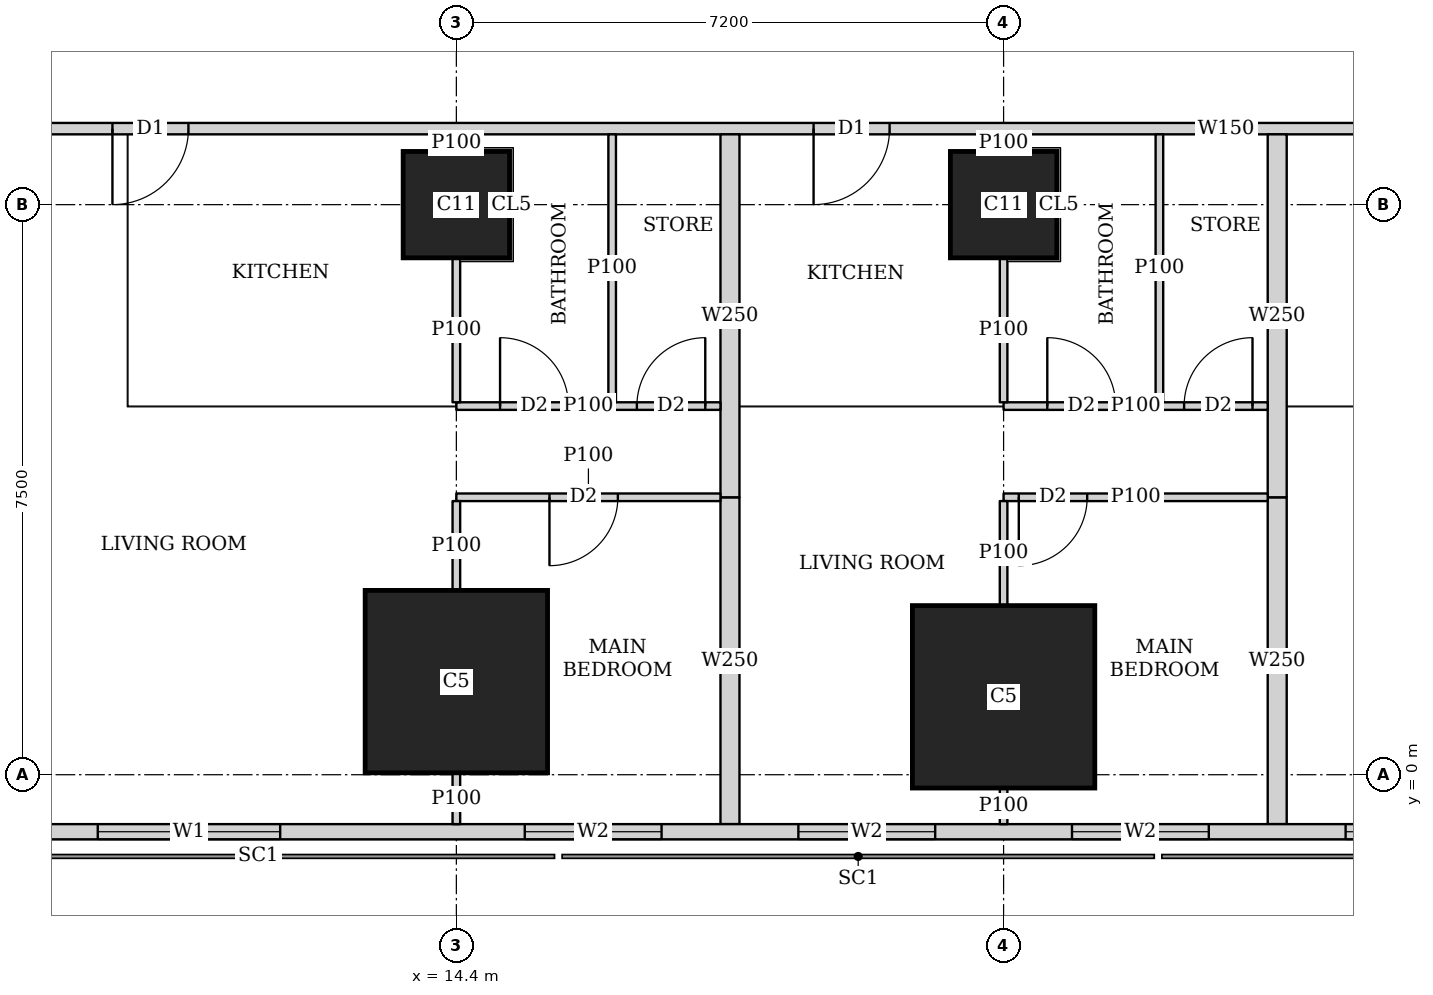
"""IFC4 building model, lengths in metres.
Left out: names, types, materials, properties, quantities, classifications, styles, units other than length and angle.
Written with IfcOpenShell. Run it as: python <this file> out.ifc"""

import sys

from ifc_helpers import new_model, si_unit, direction, frame, frame_2d, origin, origin_2d, place, context, subcontext, project, spatial, rectangle, extrude, element, fill, save


model = new_model("IFC4")
c1 = context("Model", 3, precision=1e-05, world=origin(), true_north=direction((0.0, 1.0)))
c2 = subcontext(c1, "Body", "Model", "MODEL_VIEW")
j1 = project(units=[si_unit("LENGTHUNIT", "METRE"), si_unit("PLANEANGLEUNIT", "RADIAN")], contexts=[c1])
p1 = place(None, origin())
s1 = spatial("IfcSite", under=j1, at=p1, CompositionType="ELEMENT")
p2 = place(p1, origin())
s2 = spatial("IfcBuilding", under=s1, at=p2, CompositionType="ELEMENT")
p3 = place(p2, frame((0.0, 0.0, 208.7)))
s3 = spatial("IfcBuildingStorey", under=s2, at=p3, CompositionType="ELEMENT", Elevation=208.7)
for number, where, z_axis, x_axis in (
    (1, (14.4, 1.225, 0.0), (0.0, 0.0, 1.0), (1.0, 0.0, 0.0)),
    (2, (21.6, 1.025, 0.0), (0.0, 0.0, 1.0), (1.0, 0.0, 0.0)),
):
    element("IfcColumn", number, at=place(p3, frame(where, z_axis=z_axis, x_axis=x_axis)), inside=s3, PredefinedType="COLUMN", context=c2, shape_type="SweptSolid", body=[
        extrude(rectangle(XDim=2.4, YDim=2.4, at=origin_2d()), origin(), (0.0, 0.0, 1.0), 3.75),
    ])
for number, where, z_axis, x_axis in (
    (3, (14.4, 7.5, 0.0), (0.0, 0.0, 1.0), (1.0, 0.0, 0.0)),
    (4, (21.6, 7.5, 0.0), (0.0, 0.0, 1.0), (1.0, 0.0, 0.0)),
):
    element("IfcColumn", number, at=place(p3, frame(where, z_axis=z_axis, x_axis=x_axis)), inside=s3, PredefinedType="COLUMN", context=c2, shape_type="SweptSolid", body=[
        extrude(rectangle(XDim=1.4, YDim=1.4, at=origin_2d()), origin(), (0.0, 0.0, 1.0), 3.75),
    ])
p4 = place(p3, frame((7.363, -0.75, 0.0), z_axis=(0.0, 0.0, 1.0), x_axis=(1.0, 0.0, 0.0)))
e5 = element("IfcWall", 5, at=p4, inside=s3, PredefinedType="SOLIDWALL", context=c2, shape_type="SweptSolid", body=[
    extrude(rectangle(XDim=40.428, YDim=0.2, at=frame_2d((20.214, 0.0))), origin(), (0.0, 0.0, 1.0), 3.5),
])
p5 = place(p4, frame((2.319, 0.0, 0.9)))
e6 = element("IfcOpeningElement", 6, at=p5, cuts=e5, PredefinedType="OPENING", context=c2, shape_type="SweptSolid", body=[
    extrude(rectangle(XDim=2.4, YDim=1.5, at=frame_2d((1.2, 0.75))), frame((0.0, 0.11, 0.0), z_axis=(0.0, -1.0, 0.0), x_axis=(1.0, 0.0, 0.0)), (0.0, 0.0, 1.0), 0.22),
])
p6 = place(p4, frame((7.937, 0.0, 0.9)))
e7 = element("IfcOpeningElement", 7, at=p6, cuts=e5, PredefinedType="OPENING", context=c2, shape_type="SweptSolid", body=[
    extrude(rectangle(XDim=1.8, YDim=1.5, at=frame_2d((0.9, 0.75))), frame((0.0, 0.11, 0.0), z_axis=(0.0, -1.0, 0.0), x_axis=(1.0, 0.0, 0.0)), (0.0, 0.0, 1.0), 0.22),
])
p7 = place(p4, frame((11.537, 0.0, 0.9)))
e8 = element("IfcOpeningElement", 8, at=p7, cuts=e5, PredefinedType="OPENING", context=c2, shape_type="SweptSolid", body=[
    extrude(rectangle(XDim=1.8, YDim=1.5, at=frame_2d((0.9, 0.75))), frame((0.0, 0.11, 0.0), z_axis=(0.0, -1.0, 0.0), x_axis=(1.0, 0.0, 0.0)), (0.0, 0.0, 1.0), 0.22),
])
p8 = place(p4, frame((15.137, 0.0, 0.9)))
e9 = element("IfcOpeningElement", 9, at=p8, cuts=e5, PredefinedType="OPENING", context=c2, shape_type="SweptSolid", body=[
    extrude(rectangle(XDim=1.8, YDim=1.5, at=frame_2d((0.9, 0.75))), frame((0.0, 0.11, 0.0), z_axis=(0.0, -1.0, 0.0), x_axis=(1.0, 0.0, 0.0)), (0.0, 0.0, 1.0), 0.22),
])
p9 = place(p4, frame((18.737, 0.0, 0.9)))
e10 = element("IfcOpeningElement", 10, at=p9, cuts=e5, PredefinedType="OPENING", context=c2, shape_type="SweptSolid", body=[
    extrude(rectangle(XDim=1.8, YDim=1.5, at=frame_2d((0.9, 0.75))), frame((0.0, 0.11, 0.0), z_axis=(0.0, -1.0, 0.0), x_axis=(1.0, 0.0, 0.0)), (0.0, 0.0, 1.0), 0.22),
])
p10 = place(p4, frame((22.337, 0.0, 0.9)))
e11 = element("IfcOpeningElement", 11, at=p10, cuts=e5, PredefinedType="OPENING", context=c2, shape_type="SweptSolid", body=[
    extrude(rectangle(XDim=1.8, YDim=1.5, at=frame_2d((0.9, 0.75))), frame((0.0, 0.11, 0.0), z_axis=(0.0, -1.0, 0.0), x_axis=(1.0, 0.0, 0.0)), (0.0, 0.0, 1.0), 0.22),
])
p11 = place(p4, frame((25.937, 0.0, 0.9)))
e12 = element("IfcOpeningElement", 12, at=p11, cuts=e5, PredefinedType="OPENING", context=c2, shape_type="SweptSolid", body=[
    extrude(rectangle(XDim=1.8, YDim=1.5, at=frame_2d((0.9, 0.75))), frame((0.0, 0.11, 0.0), z_axis=(0.0, -1.0, 0.0), x_axis=(1.0, 0.0, 0.0)), (0.0, 0.0, 1.0), 0.22),
])
p12 = place(p4, frame((29.537, 0.0, 0.9)))
e13 = element("IfcOpeningElement", 13, at=p12, cuts=e5, PredefinedType="OPENING", context=c2, shape_type="SweptSolid", body=[
    extrude(rectangle(XDim=1.8, YDim=1.5, at=frame_2d((0.9, 0.75))), frame((0.0, 0.11, 0.0), z_axis=(0.0, -1.0, 0.0), x_axis=(1.0, 0.0, 0.0)), (0.0, 0.0, 1.0), 0.22),
])
p13 = place(p3, frame((40.053, 8.5, 0.0), z_axis=(0.0, 0.0, 1.0), x_axis=(-1.0, 0.0, 0.0)))
e14 = element("IfcWall", 14, at=p13, inside=s3, PredefinedType="SOLIDWALL", context=c2, shape_type="SweptSolid", body=[
    extrude(rectangle(XDim=31.052, YDim=0.15, at=frame_2d((15.526, 0.0))), origin(), (0.0, 0.0, 1.0), 3.5),
])
p14 = place(p13, frame((29.178, 0.0, 0.0)))
e15 = element("IfcOpeningElement", 15, at=p14, cuts=e14, PredefinedType="OPENING", context=c2, shape_type="SweptSolid", body=[
    extrude(rectangle(XDim=1.0, YDim=2.1, at=frame_2d((0.5, 1.05))), frame((0.0, 0.085, 0.0), z_axis=(0.0, -1.0, 0.0), x_axis=(1.0, 0.0, 0.0)), (0.0, 0.0, 1.0), 0.17),
])
p15 = place(p13, frame((19.953, 0.0, 0.0)))
e16 = element("IfcOpeningElement", 16, at=p15, cuts=e14, PredefinedType="OPENING", context=c2, shape_type="SweptSolid", body=[
    extrude(rectangle(XDim=1.0, YDim=2.1, at=frame_2d((0.5, 1.05))), frame((0.0, 0.085, 0.0), z_axis=(0.0, -1.0, 0.0), x_axis=(1.0, 0.0, 0.0)), (0.0, 0.0, 1.0), 0.17),
])
p16 = place(p13, frame((12.753, 0.0, 0.0)))
e17 = element("IfcOpeningElement", 17, at=p16, cuts=e14, PredefinedType="OPENING", context=c2, shape_type="SweptSolid", body=[
    extrude(rectangle(XDim=1.0, YDim=2.1, at=frame_2d((0.5, 1.05))), frame((0.0, 0.085, 0.0), z_axis=(0.0, -1.0, 0.0), x_axis=(1.0, 0.0, 0.0)), (0.0, 0.0, 1.0), 0.17),
])
p17 = place(p13, frame((0.15, 0.0, 0.0)))
e18 = element("IfcOpeningElement", 18, at=p17, cuts=e14, PredefinedType="OPENING", context=c2, shape_type="SweptSolid", body=[
    extrude(rectangle(XDim=1.0, YDim=2.1, at=frame_2d((0.5, 1.05))), frame((0.0, 0.085, 0.0), z_axis=(0.0, -1.0, 0.0), x_axis=(1.0, 0.0, 0.0)), (0.0, 0.0, 1.0), 0.17),
])
p18 = place(p3, frame((17.875, 3.65, 0.0), z_axis=(0.0, 0.0, 1.0), x_axis=(-1.0, 0.0, 0.0)))
e19 = element("IfcWall", 19, at=p18, inside=s3, PredefinedType="PARTITIONING", context=c2, shape_type="SweptSolid", body=[
    extrude(rectangle(XDim=3.475, YDim=0.1, at=frame_2d((1.738, 0.0))), origin(), (0.0, 0.0, 1.0), 3.5),
])
p19 = place(p18, frame((1.35, 0.0, 0.0)))
e20 = element("IfcOpeningElement", 20, at=p19, cuts=e19, PredefinedType="OPENING", context=c2, shape_type="SweptSolid", body=[
    extrude(rectangle(XDim=0.9, YDim=2.1, at=frame_2d((0.45, 1.05))), frame((0.0, 0.06, 0.0), z_axis=(0.0, -1.0, 0.0), x_axis=(1.0, 0.0, 0.0)), (0.0, 0.0, 1.0), 0.12),
])
p20 = place(p3, frame((17.875, 4.85, 0.0), z_axis=(0.0, 0.0, 1.0), x_axis=(-1.0, 0.0, 0.0)))
e21 = element("IfcWall", 21, at=p20, inside=s3, PredefinedType="PARTITIONING", context=c2, shape_type="SweptSolid", body=[
    extrude(rectangle(XDim=3.475, YDim=0.1, at=frame_2d((1.738, 0.0))), origin(), (0.0, 0.0, 1.0), 3.5),
])
p21 = place(p20, frame((2.0, 0.0, 0.0)))
e22 = element("IfcOpeningElement", 22, at=p21, cuts=e21, PredefinedType="OPENING", context=c2, shape_type="SweptSolid", body=[
    extrude(rectangle(XDim=0.9, YDim=2.1, at=frame_2d((0.45, 1.05))), frame((0.0, 0.06, 0.0), z_axis=(0.0, -1.0, 0.0), x_axis=(1.0, 0.0, 0.0)), (0.0, 0.0, 1.0), 0.12),
])
p22 = place(p20, frame((0.2, 0.0, 0.0)))
e23 = element("IfcOpeningElement", 23, at=p22, cuts=e21, PredefinedType="OPENING", context=c2, shape_type="SweptSolid", body=[
    extrude(rectangle(XDim=0.9, YDim=2.1, at=frame_2d((0.45, 1.05))), frame((0.0, 0.06, 0.0), z_axis=(0.0, -1.0, 0.0), x_axis=(1.0, 0.0, 0.0)), (0.0, 0.0, 1.0), 0.12),
])
p23 = place(p3, frame((14.4, -0.65, 0.0), z_axis=(0.0, 0.0, 1.0), x_axis=(0.0, 1.0, 0.0)))
e24 = element("IfcWall", 24, at=p23, inside=s3, PredefinedType="PARTITIONING", context=c2, shape_type="SweptSolid", body=[
    extrude(rectangle(XDim=0.674, YDim=0.1, at=frame_2d((0.337, 0.0))), origin(), (0.0, 0.0, 1.0), 3.5),
])
p24 = place(p3, frame((14.4, 2.426, 0.0), z_axis=(0.0, 0.0, 1.0), x_axis=(0.0, 1.0, 0.0)))
e25 = element("IfcWall", 25, at=p24, inside=s3, PredefinedType="PARTITIONING", context=c2, shape_type="SweptSolid", body=[
    extrude(rectangle(XDim=1.174, YDim=0.1, at=frame_2d((0.587, 0.0))), origin(), (0.0, 0.0, 1.0), 3.5),
])
p25 = place(p3, frame((14.4, 4.9, 0.0), z_axis=(0.0, 0.0, 1.0), x_axis=(0.0, 1.0, 0.0)))
e26 = element("IfcWall", 26, at=p25, inside=s3, PredefinedType="PARTITIONING", context=c2, shape_type="SweptSolid", body=[
    extrude(rectangle(XDim=1.899, YDim=0.1, at=frame_2d((0.95, 0.0))), origin(), (0.0, 0.0, 1.0), 3.5),
])
p26 = place(p3, frame((14.4, 8.201, 0.0), z_axis=(0.0, 0.0, 1.0), x_axis=(0.0, 1.0, 0.0)))
e27 = element("IfcWall", 27, at=p26, inside=s3, PredefinedType="PARTITIONING", context=c2, shape_type="SweptSolid", body=[
    extrude(rectangle(XDim=0.224, YDim=0.1, at=frame_2d((0.112, 0.0))), origin(), (0.0, 0.0, 1.0), 3.5),
])
p27 = place(p3, frame((16.45, 4.9, 0.0), z_axis=(0.0, 0.0, 1.0), x_axis=(0.0, 1.0, 0.0)))
e28 = element("IfcWall", 28, at=p27, inside=s3, PredefinedType="PARTITIONING", context=c2, shape_type="SweptSolid", body=[
    extrude(rectangle(XDim=3.525, YDim=0.1, at=frame_2d((1.763, 0.0))), origin(), (0.0, 0.0, 1.0), 3.5),
])
p28 = place(p3, frame((25.075, 3.65, 0.0), z_axis=(0.0, 0.0, 1.0), x_axis=(-1.0, 0.0, 0.0)))
e29 = element("IfcWall", 29, at=p28, inside=s3, PredefinedType="PARTITIONING", context=c2, shape_type="SweptSolid", body=[
    extrude(rectangle(XDim=3.475, YDim=0.1, at=frame_2d((1.737, 0.0))), origin(), (0.0, 0.0, 1.0), 3.5),
])
p29 = place(p28, frame((2.375, 0.0, 0.0)))
e30 = element("IfcOpeningElement", 30, at=p29, cuts=e29, PredefinedType="OPENING", context=c2, shape_type="SweptSolid", body=[
    extrude(rectangle(XDim=0.9, YDim=2.1, at=frame_2d((0.45, 1.05))), frame((0.0, 0.06, 0.0), z_axis=(0.0, -1.0, 0.0), x_axis=(1.0, 0.0, 0.0)), (0.0, 0.0, 1.0), 0.12),
])
p30 = place(p3, frame((25.075, 4.85, 0.0), z_axis=(0.0, 0.0, 1.0), x_axis=(-1.0, 0.0, 0.0)))
e31 = element("IfcWall", 31, at=p30, inside=s3, PredefinedType="PARTITIONING", context=c2, shape_type="SweptSolid", body=[
    extrude(rectangle(XDim=3.475, YDim=0.1, at=frame_2d((1.737, 0.0))), origin(), (0.0, 0.0, 1.0), 3.5),
])
p31 = place(p30, frame((2.0, 0.0, 0.0)))
e32 = element("IfcOpeningElement", 32, at=p31, cuts=e31, PredefinedType="OPENING", context=c2, shape_type="SweptSolid", body=[
    extrude(rectangle(XDim=0.9, YDim=2.1, at=frame_2d((0.45, 1.05))), frame((0.0, 0.06, 0.0), z_axis=(0.0, -1.0, 0.0), x_axis=(1.0, 0.0, 0.0)), (0.0, 0.0, 1.0), 0.12),
])
p32 = place(p30, frame((0.2, 0.0, 0.0)))
e33 = element("IfcOpeningElement", 33, at=p32, cuts=e31, PredefinedType="OPENING", context=c2, shape_type="SweptSolid", body=[
    extrude(rectangle(XDim=0.9, YDim=2.1, at=frame_2d((0.45, 1.05))), frame((0.0, 0.06, 0.0), z_axis=(0.0, -1.0, 0.0), x_axis=(1.0, 0.0, 0.0)), (0.0, 0.0, 1.0), 0.12),
])
p33 = place(p3, frame((21.6, -0.65, 0.0), z_axis=(0.0, 0.0, 1.0), x_axis=(0.0, 1.0, 0.0)))
e34 = element("IfcWall", 34, at=p33, inside=s3, PredefinedType="PARTITIONING", context=c2, shape_type="SweptSolid", body=[
    extrude(rectangle(XDim=0.474, YDim=0.1, at=frame_2d((0.237, 0.0))), origin(), (0.0, 0.0, 1.0), 3.5),
])
p34 = place(p3, frame((21.6, 2.226, 0.0), z_axis=(0.0, 0.0, 1.0), x_axis=(0.0, 1.0, 0.0)))
e35 = element("IfcWall", 35, at=p34, inside=s3, PredefinedType="PARTITIONING", context=c2, shape_type="SweptSolid", body=[
    extrude(rectangle(XDim=1.374, YDim=0.1, at=frame_2d((0.687, 0.0))), origin(), (0.0, 0.0, 1.0), 3.5),
])
p35 = place(p3, frame((21.6, 4.9, 0.0), z_axis=(0.0, 0.0, 1.0), x_axis=(0.0, 1.0, 0.0)))
e36 = element("IfcWall", 36, at=p35, inside=s3, PredefinedType="PARTITIONING", context=c2, shape_type="SweptSolid", body=[
    extrude(rectangle(XDim=1.899, YDim=0.1, at=frame_2d((0.95, 0.0))), origin(), (0.0, 0.0, 1.0), 3.5),
])
p36 = place(p3, frame((21.6, 8.201, 0.0), z_axis=(0.0, 0.0, 1.0), x_axis=(0.0, 1.0, 0.0)))
e37 = element("IfcWall", 37, at=p36, inside=s3, PredefinedType="PARTITIONING", context=c2, shape_type="SweptSolid", body=[
    extrude(rectangle(XDim=0.224, YDim=0.1, at=frame_2d((0.112, 0.0))), origin(), (0.0, 0.0, 1.0), 3.5),
])
p37 = place(p3, frame((23.65, 4.9, 0.0), z_axis=(0.0, 0.0, 1.0), x_axis=(0.0, 1.0, 0.0)))
e38 = element("IfcWall", 38, at=p37, inside=s3, PredefinedType="PARTITIONING", context=c2, shape_type="SweptSolid", body=[
    extrude(rectangle(XDim=3.525, YDim=0.1, at=frame_2d((1.763, 0.0))), origin(), (0.0, 0.0, 1.0), 3.5),
])
p38 = place(p3, frame((18.0, -0.65, 0.0), z_axis=(0.0, 0.0, 1.0), x_axis=(0.0, 1.0, 0.0)))
e39 = element("IfcWall", 39, at=p38, inside=s3, PredefinedType="SOLIDWALL", context=c2, shape_type="SweptSolid", body=[
    extrude(rectangle(XDim=4.3, YDim=0.25, at=frame_2d((2.15, 0.0))), origin(), (0.0, 0.0, 1.0), 2.05),
])
p39 = place(p3, frame((18.0, 3.65, 0.0), z_axis=(0.0, 0.0, 1.0), x_axis=(0.0, 1.0, 0.0)))
e40 = element("IfcWall", 40, at=p39, inside=s3, PredefinedType="SOLIDWALL", context=c2, shape_type="SweptSolid", body=[
    extrude(rectangle(XDim=4.775, YDim=0.25, at=frame_2d((2.388, 0.0))), origin(), (0.0, 0.0, 1.0), 3.5),
])
p40 = place(p3, frame((25.2, -0.65, 0.0), z_axis=(0.0, 0.0, 1.0), x_axis=(0.0, 1.0, 0.0)))
e41 = element("IfcWall", 41, at=p40, inside=s3, PredefinedType="SOLIDWALL", context=c2, shape_type="SweptSolid", body=[
    extrude(rectangle(XDim=4.3, YDim=0.25, at=frame_2d((2.15, 0.0))), origin(), (0.0, 0.0, 1.0), 2.05),
])
p41 = place(p3, frame((25.2, 3.65, 0.0), z_axis=(0.0, 0.0, 1.0), x_axis=(0.0, 1.0, 0.0)))
e42 = element("IfcWall", 42, at=p41, inside=s3, PredefinedType="SOLIDWALL", context=c2, shape_type="SweptSolid", body=[
    extrude(rectangle(XDim=4.775, YDim=0.25, at=frame_2d((2.388, 0.0))), origin(), (0.0, 0.0, 1.0), 3.5),
])
p42 = place(p5, origin())
e43 = element("IfcWindow", 43, at=p42, inside=s3, PartitioningType="SINGLE_PANEL", PredefinedType="WINDOW", context=c2, shape_type="SweptSolid", body=[
    extrude(rectangle(XDim=2.4, YDim=1.5, at=frame_2d((1.2, 0.75))), frame((0.0, 0.03, 0.0), z_axis=(0.0, -1.0, 0.0), x_axis=(1.0, 0.0, 0.0)), (0.0, 0.0, 1.0), 0.06),
])
fill(e6, e43)
p43 = place(p6, origin())
e44 = element("IfcWindow", 44, at=p43, inside=s3, PartitioningType="SINGLE_PANEL", PredefinedType="WINDOW", context=c2, shape_type="SweptSolid", body=[
    extrude(rectangle(XDim=1.8, YDim=1.5, at=frame_2d((0.9, 0.75))), frame((0.0, 0.03, 0.0), z_axis=(0.0, -1.0, 0.0), x_axis=(1.0, 0.0, 0.0)), (0.0, 0.0, 1.0), 0.06),
])
fill(e7, e44)
p44 = place(p7, origin())
e45 = element("IfcWindow", 45, at=p44, inside=s3, PartitioningType="SINGLE_PANEL", PredefinedType="WINDOW", context=c2, shape_type="SweptSolid", body=[
    extrude(rectangle(XDim=1.8, YDim=1.5, at=frame_2d((0.9, 0.75))), frame((0.0, 0.03, 0.0), z_axis=(0.0, -1.0, 0.0), x_axis=(1.0, 0.0, 0.0)), (0.0, 0.0, 1.0), 0.06),
])
fill(e8, e45)
p45 = place(p8, origin())
e46 = element("IfcWindow", 46, at=p45, inside=s3, PartitioningType="SINGLE_PANEL", PredefinedType="WINDOW", context=c2, shape_type="SweptSolid", body=[
    extrude(rectangle(XDim=1.8, YDim=1.5, at=frame_2d((0.9, 0.75))), frame((0.0, 0.03, 0.0), z_axis=(0.0, -1.0, 0.0), x_axis=(1.0, 0.0, 0.0)), (0.0, 0.0, 1.0), 0.06),
])
fill(e9, e46)
p46 = place(p9, origin())
e47 = element("IfcWindow", 47, at=p46, inside=s3, PartitioningType="SINGLE_PANEL", PredefinedType="WINDOW", context=c2, shape_type="SweptSolid", body=[
    extrude(rectangle(XDim=1.8, YDim=1.5, at=frame_2d((0.9, 0.75))), frame((0.0, 0.03, 0.0), z_axis=(0.0, -1.0, 0.0), x_axis=(1.0, 0.0, 0.0)), (0.0, 0.0, 1.0), 0.06),
])
fill(e10, e47)
p47 = place(p19, origin())
e48 = element("IfcDoor", 48, at=p47, inside=s3, OperationType="SINGLE_SWING_RIGHT", PredefinedType="DOOR", context=c2, shape_type="SweptSolid", body=[
    extrude(rectangle(XDim=0.9, YDim=2.1, at=frame_2d((0.45, 1.05))), frame((0.0, 0.025, 0.0), z_axis=(0.0, -1.0, 0.0), x_axis=(1.0, 0.0, 0.0)), (0.0, 0.0, 1.0), 0.05),
])
fill(e20, e48)
p48 = place(p21, origin())
e49 = element("IfcDoor", 49, at=p48, inside=s3, OperationType="SINGLE_SWING_LEFT", PredefinedType="DOOR", context=c2, shape_type="SweptSolid", body=[
    extrude(rectangle(XDim=0.9, YDim=2.1, at=frame_2d((0.45, 1.05))), frame((0.0, 0.025, 0.0), z_axis=(0.0, -1.0, 0.0), x_axis=(1.0, 0.0, 0.0)), (0.0, 0.0, 1.0), 0.05),
])
fill(e22, e49)
p49 = place(p22, origin())
e50 = element("IfcDoor", 50, at=p49, inside=s3, OperationType="SINGLE_SWING_RIGHT", PredefinedType="DOOR", context=c2, shape_type="SweptSolid", body=[
    extrude(rectangle(XDim=0.9, YDim=2.1, at=frame_2d((0.45, 1.05))), frame((0.0, 0.025, 0.0), z_axis=(0.0, -1.0, 0.0), x_axis=(1.0, 0.0, 0.0)), (0.0, 0.0, 1.0), 0.05),
])
fill(e23, e50)
p50 = place(p14, origin())
e51 = element("IfcDoor", 51, at=p50, inside=s3, OperationType="SINGLE_SWING_RIGHT", PredefinedType="DOOR", context=c2, shape_type="SweptSolid", body=[
    extrude(rectangle(XDim=1.0, YDim=2.1, at=frame_2d((0.5, 1.05))), frame((0.0, 0.025, 0.0), z_axis=(0.0, -1.0, 0.0), x_axis=(1.0, 0.0, 0.0)), (0.0, 0.0, 1.0), 0.05),
])
fill(e15, e51)
p51 = place(p29, origin())
e52 = element("IfcDoor", 52, at=p51, inside=s3, OperationType="SINGLE_SWING_RIGHT", PredefinedType="DOOR", context=c2, shape_type="SweptSolid", body=[
    extrude(rectangle(XDim=0.9, YDim=2.1, at=frame_2d((0.45, 1.05))), frame((0.0, 0.025, 0.0), z_axis=(0.0, -1.0, 0.0), x_axis=(1.0, 0.0, 0.0)), (0.0, 0.0, 1.0), 0.05),
])
fill(e30, e52)
p52 = place(p31, origin())
e53 = element("IfcDoor", 53, at=p52, inside=s3, OperationType="SINGLE_SWING_LEFT", PredefinedType="DOOR", context=c2, shape_type="SweptSolid", body=[
    extrude(rectangle(XDim=0.9, YDim=2.1, at=frame_2d((0.45, 1.05))), frame((0.0, 0.025, 0.0), z_axis=(0.0, -1.0, 0.0), x_axis=(1.0, 0.0, 0.0)), (0.0, 0.0, 1.0), 0.05),
])
fill(e32, e53)
p53 = place(p32, origin())
e54 = element("IfcDoor", 54, at=p53, inside=s3, OperationType="SINGLE_SWING_RIGHT", PredefinedType="DOOR", context=c2, shape_type="SweptSolid", body=[
    extrude(rectangle(XDim=0.9, YDim=2.1, at=frame_2d((0.45, 1.05))), frame((0.0, 0.025, 0.0), z_axis=(0.0, -1.0, 0.0), x_axis=(1.0, 0.0, 0.0)), (0.0, 0.0, 1.0), 0.05),
])
fill(e33, e54)
p54 = place(p15, origin())
e55 = element("IfcDoor", 55, at=p54, inside=s3, OperationType="SINGLE_SWING_RIGHT", PredefinedType="DOOR", context=c2, shape_type="SweptSolid", body=[
    extrude(rectangle(XDim=1.0, YDim=2.1, at=frame_2d((0.5, 1.05))), frame((0.0, 0.025, 0.0), z_axis=(0.0, -1.0, 0.0), x_axis=(1.0, 0.0, 0.0)), (0.0, 0.0, 1.0), 0.05),
])
fill(e16, e55)
save(model, sys.argv[1])
